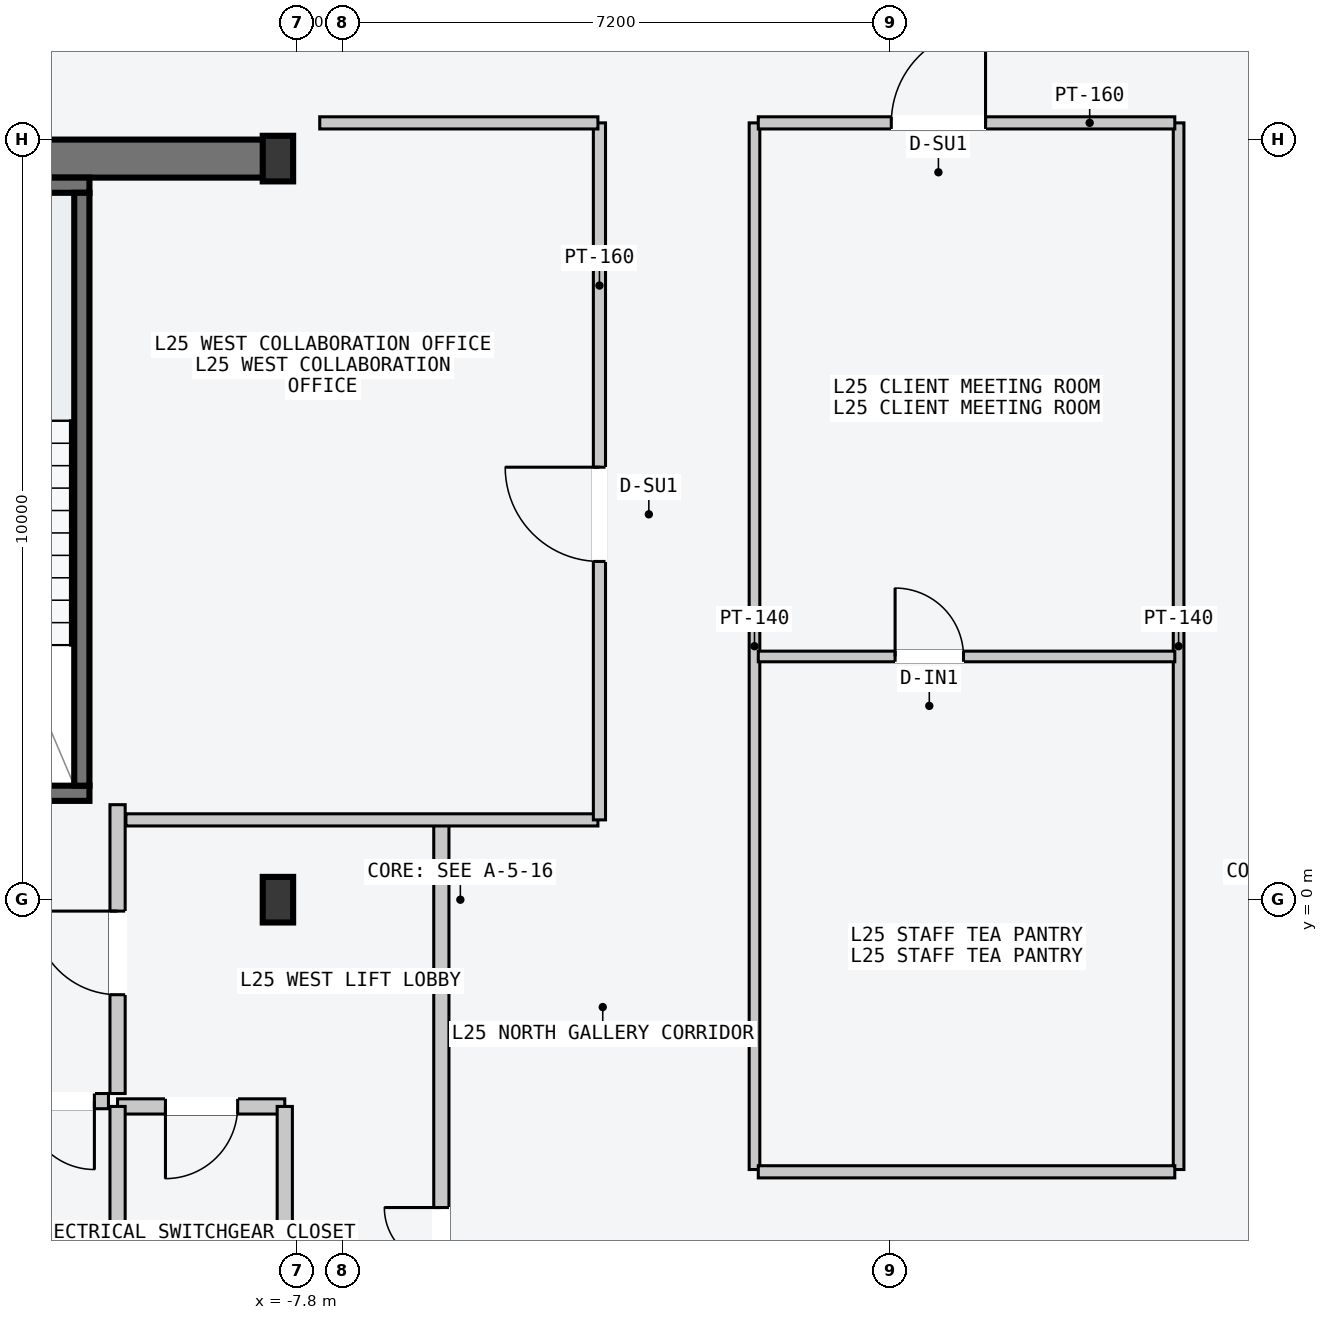
"""IFC4 building model, lengths in metres.
Left out: names, types, materials, properties, quantities, classifications, styles, units other than length and angle.
Written with IfcOpenShell. Run it as: python <this file> out.ifc"""

import sys

from ifc_helpers import new_model, si_unit, direction, frame, frame_2d, origin, origin_2d, place, context, subcontext, project, spatial, rectangle, i_section, extrude, element, fill, save


model = new_model("IFC4")
c1 = context("Model", 3, precision=1e-05, world=origin(), true_north=direction((0.0, 1.0)))
c2 = subcontext(c1, "Body", "Model", "MODEL_VIEW")
j1 = project(units=[si_unit("LENGTHUNIT", "METRE"), si_unit("PLANEANGLEUNIT", "RADIAN")], contexts=[c1])
p1 = place(None, origin())
s1 = spatial("IfcSite", under=j1, at=p1, CompositionType="ELEMENT")
p2 = place(p1, origin())
s2 = spatial("IfcBuilding", under=s1, at=p2, CompositionType="ELEMENT")
p3 = place(p2, frame((0.0, 0.0, 99.0)))
s3 = spatial("IfcBuildingStorey", under=s2, at=p3, CompositionType="ELEMENT", Elevation=99.0)
p4 = place(p3, frame((-14.53, 9.75, -0.2), z_axis=(0.0, 0.0, 1.0), x_axis=(1.0, 0.0, 0.0)))
e1 = element("IfcWall", 1, at=p4, inside=s3, PredefinedType="SHEAR", context=c2, shape_type="SweptSolid", body=[
    extrude(rectangle(XDim=6.46, YDim=0.5, at=frame_2d((3.23, 0.0))), origin(), (0.0, 0.0, 1.0), 3.6),
])
p5 = place(p3, frame((-14.25, 1.4, -0.2), z_axis=(0.0, 0.0, 1.0), x_axis=(1.0, 0.0, 0.0)))
e2 = element("IfcWall", 2, at=p5, inside=s3, PredefinedType="SOLIDWALL", context=c2, shape_type="SweptSolid", body=[
    extrude(rectangle(XDim=3.72, YDim=0.2, at=frame_2d((1.86, 0.0))), origin(), (0.0, 0.0, 1.0), 3.6),
])
p6 = place(p5, frame((1.5, 0.0, 0.2)))
e3 = element("IfcOpeningElement", 3, at=p6, cuts=e2, PredefinedType="OPENING", context=c2, shape_type="SweptSolid", body=[
    extrude(rectangle(XDim=1.12, YDim=2.18, at=frame_2d((0.56, 1.09))), frame((0.0, 0.11, 0.0), z_axis=(0.0, -1.0, 0.0), x_axis=(1.0, 0.0, 0.0)), (0.0, 0.0, 1.0), 0.22),
])
p7 = place(p3, frame((-14.25, 9.4, -0.2), z_axis=(0.0, 0.0, 1.0), x_axis=(1.0, 0.0, 0.0)))
e4 = element("IfcWall", 4, at=p7, inside=s3, PredefinedType="SOLIDWALL", context=c2, shape_type="SweptSolid", body=[
    extrude(rectangle(XDim=3.72, YDim=0.2, at=frame_2d((1.86, 0.0))), origin(), (0.0, 0.0, 1.0), 3.6),
])
p8 = place(p3, frame((-10.63, 1.5, -0.2), z_axis=(0.0, 0.0, 1.0), x_axis=(0.0, 1.0, 0.0)))
e5 = element("IfcWall", 5, at=p8, inside=s3, PredefinedType="SOLIDWALL", context=c2, shape_type="SweptSolid", body=[
    extrude(rectangle(XDim=7.8, YDim=0.2, at=frame_2d((3.9, 0.0))), origin(), (0.0, 0.0, 1.0), 3.6),
])
for number, where, z_axis, x_axis in (
    (6, (-8.05, 0.0, 0.0), (0.0, 0.0, 1.0), (1.0, 0.0, 0.0)),
    (7, (-8.05, 9.75, 0.0), (0.0, 0.0, 1.0), (1.0, 0.0, 0.0)),
):
    element("IfcColumn", number, at=place(p3, frame(where, z_axis=z_axis, x_axis=x_axis)), inside=s3, PredefinedType="COLUMN", context=c2, shape_type="SweptSolid", body=[
        extrude(i_section(OverallWidth=0.4, OverallDepth=0.6, WebThickness=0.022, FlangeThickness=0.036, at=origin_2d()), origin(), (0.0, 0.0, 1.0), 3.6),
    ])
p9 = place(p3, frame((-5.9, -9.45, 0.0), z_axis=(0.0, 0.0, 1.0), x_axis=(0.0, 1.0, 0.0)))
e8 = element("IfcWall", 8, at=p9, inside=s3, PredefinedType="PARTITIONING", context=c2, shape_type="SweptSolid", body=[
    extrude(rectangle(XDim=10.5, YDim=0.2, at=frame_2d((5.25, 0.0))), origin(), (0.0, 0.0, 1.0), 3.4),
])
p10 = place(p9, frame((3.9, 0.0, 0.0)))
e9 = element("IfcOpeningElement", 9, at=p10, cuts=e8, PredefinedType="OPENING", context=c2, shape_type="SweptSolid", body=[
    extrude(rectangle(XDim=1.5, YDim=2.2, at=frame_2d((0.75, 1.1))), frame((0.0, 0.11, 0.0), z_axis=(0.0, -1.0, 0.0), x_axis=(1.0, 0.0, 0.0)), (0.0, 0.0, 1.0), 0.22),
])
p11 = place(p3, frame((-10.16, -2.55, 0.0), z_axis=(0.0, 0.0, 1.0), x_axis=(0.0, 1.0, 0.0)))
e10 = element("IfcWall", 10, at=p11, inside=s3, PredefinedType="PARTITIONING", context=c2, shape_type="SweptSolid", body=[
    extrude(rectangle(XDim=3.8, YDim=0.2, at=frame_2d((1.9, 0.0))), origin(), (0.0, 0.0, 1.0), 3.4),
])
p12 = place(p11, frame((1.3, 0.0, 0.0)))
e11 = element("IfcOpeningElement", 11, at=p12, cuts=e10, PredefinedType="OPENING", context=c2, shape_type="SweptSolid", body=[
    extrude(rectangle(XDim=1.1, YDim=2.15, at=frame_2d((0.55, 1.075))), frame((0.0, 0.11, 0.0), z_axis=(0.0, -1.0, 0.0), x_axis=(1.0, 0.0, 0.0)), (0.0, 0.0, 1.0), 0.22),
])
p13 = place(p3, frame((-10.28, -2.65, 0.0), z_axis=(0.0, 0.0, 1.0), x_axis=(-1.0, 0.0, 0.0)))
e12 = element("IfcWall", 12, at=p13, inside=s3, PredefinedType="PARTITIONING", context=c2, shape_type="SweptSolid", body=[
    extrude(rectangle(XDim=1.27, YDim=0.2, at=frame_2d((0.635, 0.0))), origin(), (0.0, 0.0, 1.0), 3.4),
])
p14 = place(p13, frame((0.185, 0.0, 0.0)))
e13 = element("IfcOpeningElement", 13, at=p14, cuts=e12, PredefinedType="OPENING", context=c2, shape_type="SweptSolid", body=[
    extrude(rectangle(XDim=0.9, YDim=2.15, at=frame_2d((0.45, 1.075))), frame((0.0, 0.11, 0.0), z_axis=(0.0, -1.0, 0.0), x_axis=(1.0, 0.0, 0.0)), (0.0, 0.0, 1.0), 0.22),
])
p15 = place(p3, frame((-7.96, -2.72, 0.0), z_axis=(0.0, 0.0, 1.0), x_axis=(-1.0, 0.0, 0.0)))
e14 = element("IfcWall", 14, at=p15, inside=s3, PredefinedType="PARTITIONING", context=c2, shape_type="SweptSolid", body=[
    extrude(rectangle(XDim=2.2, YDim=0.2, at=frame_2d((1.1, 0.0))), origin(), (0.0, 0.0, 1.0), 3.4),
])
p16 = place(p15, frame((0.62, 0.0, 0.0)))
e15 = element("IfcOpeningElement", 15, at=p16, cuts=e14, PredefinedType="OPENING", context=c2, shape_type="SweptSolid", body=[
    extrude(rectangle(XDim=0.95, YDim=2.1, at=frame_2d((0.475, 1.05))), frame((0.0, 0.11, 0.0), z_axis=(0.0, -1.0, 0.0), x_axis=(1.0, 0.0, 0.0)), (0.0, 0.0, 1.0), 0.22),
])
for number, where, z_axis, x_axis in (
    (16, (-7.96, -5.16, 0.0), (0.0, 0.0, 1.0), (0.0, 1.0, 0.0)),
    (17, (-10.16, -5.16, 0.0), (0.0, 0.0, 1.0), (0.0, 1.0, 0.0)),
):
    element("IfcWall", number, at=place(p3, frame(where, z_axis=z_axis, x_axis=x_axis)), inside=s3, PredefinedType="PARTITIONING", context=c2, shape_type="SweptSolid", body=[
        extrude(rectangle(XDim=2.44, YDim=0.2, at=frame_2d((1.22, 0.0))), origin(), (0.0, 0.0, 1.0), 3.4),
    ])
p17 = place(p3, frame((-10.05, 1.05, 0.0), z_axis=(0.0, 0.0, 1.0), x_axis=(1.0, 0.0, 0.0)))
e18 = element("IfcWall", 18, at=p17, inside=s3, PredefinedType="PARTITIONING", context=c2, shape_type="SweptSolid", body=[
    extrude(rectangle(XDim=6.21, YDim=0.16, at=frame_2d((3.105, 0.0))), origin(), (0.0, 0.0, 1.0), 3.4),
])
p18 = place(p3, frame((-3.82, 1.05, 0.0), z_axis=(0.0, 0.0, 1.0), x_axis=(0.0, 1.0, 0.0)))
e19 = element("IfcWall", 19, at=p18, inside=s3, PredefinedType="PARTITIONING", context=c2, shape_type="SweptSolid", body=[
    extrude(rectangle(XDim=9.17, YDim=0.16, at=frame_2d((4.585, 0.0))), origin(), (0.0, 0.0, 1.0), 3.4),
])
p19 = place(p18, frame((3.4, 0.0, 0.0)))
e20 = element("IfcOpeningElement", 20, at=p19, cuts=e19, PredefinedType="OPENING", context=c2, shape_type="SweptSolid", body=[
    extrude(rectangle(XDim=1.24, YDim=2.24, at=frame_2d((0.62, 1.12))), frame((0.0, 0.09, 0.0), z_axis=(0.0, -1.0, 0.0), x_axis=(1.0, 0.0, 0.0)), (0.0, 0.0, 1.0), 0.18),
])
p20 = place(p3, frame((-7.5, 10.22, 0.0), z_axis=(0.0, 0.0, 1.0), x_axis=(1.0, 0.0, 0.0)))
e21 = element("IfcWall", 21, at=p20, inside=s3, PredefinedType="PARTITIONING", context=c2, shape_type="SweptSolid", body=[
    extrude(rectangle(XDim=3.66, YDim=0.16, at=frame_2d((1.83, 0.0))), origin(), (0.0, 0.0, 1.0), 3.4),
])
for number, where, z_axis, x_axis in (
    (22, (-1.78, -3.55, 0.0), (0.0, 0.0, 1.0), (0.0, 1.0, 0.0)),
    (23, (3.8, -3.55, 0.0), (0.0, 0.0, 1.0), (0.0, 1.0, 0.0)),
):
    element("IfcWall", number, at=place(p3, frame(where, z_axis=z_axis, x_axis=x_axis)), inside=s3, PredefinedType="PARTITIONING", context=c2, shape_type="SweptSolid", body=[
        extrude(rectangle(XDim=13.77, YDim=0.14, at=frame_2d((6.885, 0.0))), origin(), (0.0, 0.0, 1.0), 3.4),
    ])
p21 = place(p3, frame((-1.73, -3.58, 0.0), z_axis=(0.0, 0.0, 1.0), x_axis=(1.0, 0.0, 0.0)))
e24 = element("IfcWall", 24, at=p21, inside=s3, PredefinedType="PARTITIONING", context=c2, shape_type="SweptSolid", body=[
    extrude(rectangle(XDim=5.48, YDim=0.16, at=frame_2d((2.74, 0.0))), origin(), (0.0, 0.0, 1.0), 3.4),
])
p22 = place(p3, frame((-1.73, 3.2, 0.0), z_axis=(0.0, 0.0, 1.0), x_axis=(1.0, 0.0, 0.0)))
e25 = element("IfcWall", 25, at=p22, inside=s3, PredefinedType="PARTITIONING", context=c2, shape_type="SweptSolid", body=[
    extrude(rectangle(XDim=5.48, YDim=0.14, at=frame_2d((2.74, 0.0))), origin(), (0.0, 0.0, 1.0), 3.4),
])
p23 = place(p22, frame((1.8, 0.0, 0.0)))
e26 = element("IfcOpeningElement", 26, at=p23, cuts=e25, PredefinedType="OPENING", context=c2, shape_type="SweptSolid", body=[
    extrude(rectangle(XDim=0.9, YDim=2.15, at=frame_2d((0.45, 1.075))), frame((0.0, 0.08, 0.0), z_axis=(0.0, -1.0, 0.0), x_axis=(1.0, 0.0, 0.0)), (0.0, 0.0, 1.0), 0.16),
])
p24 = place(p3, frame((-1.73, 10.22, 0.0), z_axis=(0.0, 0.0, 1.0), x_axis=(1.0, 0.0, 0.0)))
e27 = element("IfcWall", 27, at=p24, inside=s3, PredefinedType="PARTITIONING", context=c2, shape_type="SweptSolid", body=[
    extrude(rectangle(XDim=5.48, YDim=0.16, at=frame_2d((2.74, 0.0))), origin(), (0.0, 0.0, 1.0), 3.4),
])
p25 = place(p24, frame((1.75, 0.0, 0.0)))
e28 = element("IfcOpeningElement", 28, at=p25, cuts=e27, PredefinedType="OPENING", context=c2, shape_type="SweptSolid", body=[
    extrude(rectangle(XDim=1.24, YDim=2.24, at=frame_2d((0.62, 1.12))), frame((0.0, 0.09, 0.0), z_axis=(0.0, -1.0, 0.0), x_axis=(1.0, 0.0, 0.0)), (0.0, 0.0, 1.0), 0.18),
])
p26 = place(p10, origin())
e29 = element("IfcDoor", 29, at=p26, inside=s3, OperationType="DOUBLE_DOOR_SINGLE_SWING", PredefinedType="DOOR", context=c2, shape_type="SweptSolid", body=[
    extrude(rectangle(XDim=1.5, YDim=2.2, at=frame_2d((0.75, 1.1))), frame((0.0, 0.025, 0.0), z_axis=(0.0, -1.0, 0.0), x_axis=(1.0, 0.0, 0.0)), (0.0, 0.0, 1.0), 0.05),
])
fill(e9, e29)
p27 = place(p12, origin())
e30 = element("IfcDoor", 30, at=p27, inside=s3, OperationType="SINGLE_SWING_RIGHT", PredefinedType="DOOR", context=c2, shape_type="SweptSolid", body=[
    extrude(rectangle(XDim=1.1, YDim=2.15, at=frame_2d((0.55, 1.075))), frame((0.0, 0.025, 0.0), z_axis=(0.0, -1.0, 0.0), x_axis=(1.0, 0.0, 0.0)), (0.0, 0.0, 1.0), 0.05),
])
fill(e11, e30)
p28 = place(p14, origin())
e31 = element("IfcDoor", 31, at=p28, inside=s3, OperationType="SINGLE_SWING_LEFT", PredefinedType="DOOR", context=c2, shape_type="SweptSolid", body=[
    extrude(rectangle(XDim=0.9, YDim=2.15, at=frame_2d((0.45, 1.075))), frame((0.0, 0.025, 0.0), z_axis=(0.0, -1.0, 0.0), x_axis=(1.0, 0.0, 0.0)), (0.0, 0.0, 1.0), 0.05),
])
fill(e13, e31)
p29 = place(p16, origin())
e32 = element("IfcDoor", 32, at=p29, inside=s3, OperationType="SINGLE_SWING_RIGHT", PredefinedType="DOOR", context=c2, shape_type="SweptSolid", body=[
    extrude(rectangle(XDim=0.95, YDim=2.1, at=frame_2d((0.475, 1.05))), frame((0.0, 0.025, 0.0), z_axis=(0.0, -1.0, 0.0), x_axis=(1.0, 0.0, 0.0)), (0.0, 0.0, 1.0), 0.05),
])
fill(e15, e32)
p30 = place(p19, origin())
e33 = element("IfcDoor", 33, at=p30, inside=s3, OperationType="SINGLE_SWING_RIGHT", PredefinedType="DOOR", context=c2, shape_type="SweptSolid", body=[
    extrude(rectangle(XDim=1.24, YDim=2.24, at=frame_2d((0.62, 1.12))), frame((0.0, 0.025, 0.0), z_axis=(0.0, -1.0, 0.0), x_axis=(1.0, 0.0, 0.0)), (0.0, 0.0, 1.0), 0.05),
])
fill(e20, e33)
p31 = place(p23, origin())
e34 = element("IfcDoor", 34, at=p31, inside=s3, OperationType="SINGLE_SWING_LEFT", PredefinedType="DOOR", context=c2, shape_type="SweptSolid", body=[
    extrude(rectangle(XDim=0.9, YDim=2.15, at=frame_2d((0.45, 1.075))), frame((0.0, 0.025, 0.0), z_axis=(0.0, -1.0, 0.0), x_axis=(1.0, 0.0, 0.0)), (0.0, 0.0, 1.0), 0.05),
])
fill(e26, e34)
p32 = place(p25, origin())
e35 = element("IfcDoor", 35, at=p32, inside=s3, OperationType="SINGLE_SWING_RIGHT", PredefinedType="DOOR", context=c2, shape_type="SweptSolid", body=[
    extrude(rectangle(XDim=1.24, YDim=2.24, at=frame_2d((0.62, 1.12))), frame((0.0, 0.025, 0.0), z_axis=(0.0, -1.0, 0.0), x_axis=(1.0, 0.0, 0.0)), (0.0, 0.0, 1.0), 0.05),
])
fill(e28, e35)
save(model, sys.argv[1])
